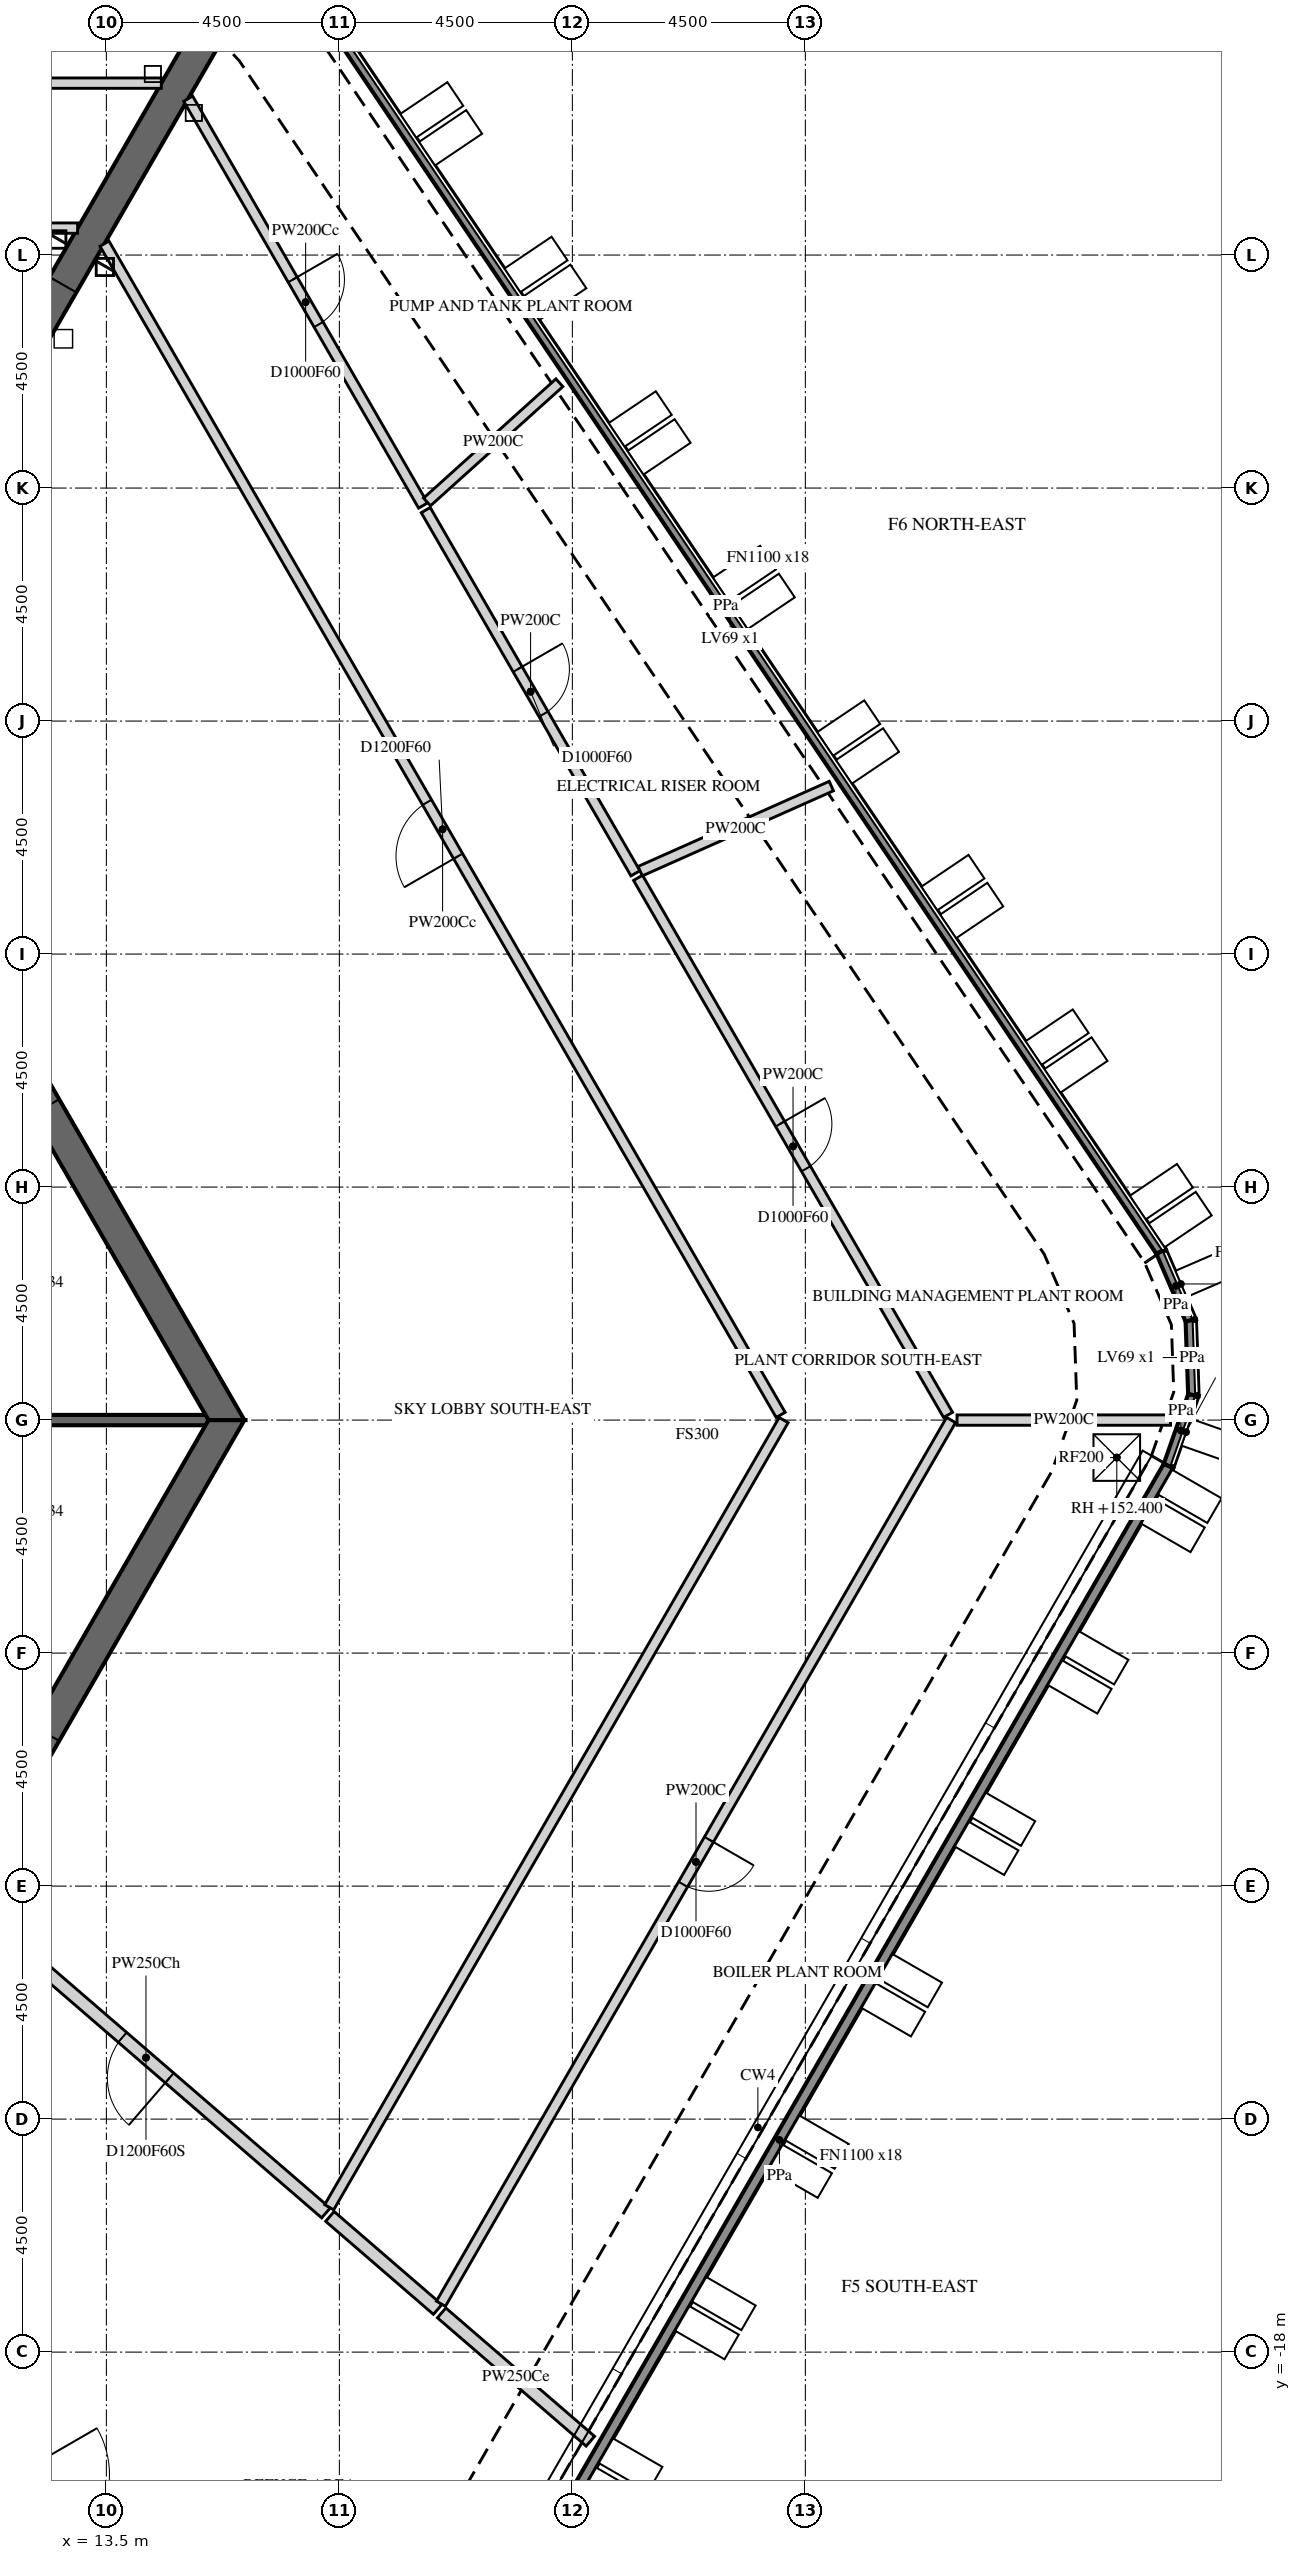
"""IFC4 building model, lengths in metres.
Left out: names, types, materials, properties, quantities, classifications, styles, units other than length and angle.
Written with IfcOpenShell. Run it as: python <this file> out.ifc"""

import sys

from ifc_helpers import new_model, si_unit, direction, frame, frame_2d, origin, origin_2d, place, context, subcontext, project, spatial, polyline, rectangle, outline, extrude, element, fill, save


model = new_model("IFC4")
c1 = context("Model", 3, precision=1e-05, world=origin(), true_north=direction((0.0, 1.0)))
c2 = subcontext(c1, "Body", "Model", "MODEL_VIEW")
j1 = project(units=[si_unit("LENGTHUNIT", "METRE"), si_unit("PLANEANGLEUNIT", "RADIAN")], contexts=[c1])
p1 = place(None, origin())
s1 = spatial("IfcSite", under=j1, at=p1, CompositionType="ELEMENT")
p2 = place(p1, origin())
s2 = spatial("IfcBuilding", under=s1, at=p2, CompositionType="ELEMENT")
p3 = place(p2, frame((0.0, 0.0, 146.7)))
s3 = spatial("IfcBuildingStorey", under=s2, at=p3, CompositionType="ELEMENT", Elevation=146.7)
p4 = place(p3, frame((17.062, 28.174, 5.7), z_axis=(0.0, 0.0, 1.0), x_axis=(0.559191272145, -0.829038672896, 0.0)))
e1 = element("IfcWall", 1, at=p4, inside=s3, PredefinedType="PARAPET", context=c2, shape_type="SweptSolid", body=[
    extrude(outline(polyline([(0.008, -0.1), (30.044, -0.1), (30.063, 0.1), (-0.008, 0.1), (0.008, -0.1)])), origin(), (0.0, 0.0, 1.0), 1.1),
])
p5 = place(p3, frame((33.868, 3.259, 5.7), z_axis=(0.0, 0.0, 1.0), x_axis=(0.396149459685, -0.918186040839, 0.0)))
e2 = element("IfcWall", 2, at=p5, inside=s3, PredefinedType="PARAPET", context=c2, shape_type="SweptSolid", body=[
    extrude(outline(polyline([(0.009, -0.1), (1.434, -0.1), (1.471, 0.1), (-0.009, 0.1), (0.009, -0.1)])), origin(), (0.0, 0.0, 1.0), 1.1),
])
p6 = place(p3, frame((34.443, 1.925, 5.7), z_axis=(0.0, 0.0, 1.0), x_axis=(0.034852691187, -0.999392460406, 0.0)))
e3 = element("IfcWall", 3, at=p6, inside=s3, PredefinedType="PARAPET", context=c2, shape_type="SweptSolid", body=[
    extrude(outline(polyline([(0.019, -0.1), (1.424, -0.1), (1.462, 0.1), (-0.019, 0.1), (0.019, -0.1)])), origin(), (0.0, 0.0, 1.0), 1.1),
])
p7 = place(p3, frame((34.494, 0.483, 5.7), z_axis=(0.0, 0.0, 1.0), x_axis=(-0.331061462049, -0.943609192593, 0.0)))
e4 = element("IfcWall", 4, at=p7, inside=s3, PredefinedType="PARAPET", context=c2, shape_type="SweptSolid", body=[
    extrude(outline(polyline([(0.019, -0.1), (1.444, -0.1), (1.462, 0.1), (-0.019, 0.1), (0.019, -0.1)])), origin(), (0.0, 0.0, 1.0), 1.1),
])
p8 = place(p3, frame((34.013, -0.888, 5.7), z_axis=(0.0, 0.0, 1.0), x_axis=(-0.499996465352, -0.866027444505, 0.0)))
e5 = element("IfcWall", 5, at=p8, inside=s3, PredefinedType="PARAPET", context=c2, shape_type="SweptSolid", body=[
    extrude(outline(polyline([(0.009, -0.1), (30.045, -0.1), (30.062, 0.1), (-0.009, 0.1), (0.009, -0.1)])), origin(), (0.0, 0.0, 1.0), 1.1),
])
p9 = place(p3, frame((7.91, -13.7, -0.3), z_axis=(0.0, 0.0, 1.0), x_axis=(0.499999880136, 0.866025472988, 0.0)))
e6 = element("IfcWall", 6, at=p9, inside=s3, PredefinedType="SHEAR", context=c2, shape_type="SweptSolid", body=[
    extrude(outline(polyline([(-0.173, -0.3), (15.993, -0.3), (15.646, 0.3), (0.173, 0.3), (-0.173, -0.3)])), origin(), (0.0, 0.0, 1.0), 5.8),
])
p10 = place(p9, frame((7.039, 0.0, 0.3)))
e7 = element("IfcOpeningElement", 7, at=p10, cuts=e6, PredefinedType="OPENING", context=c2, shape_type="SweptSolid", body=[
    extrude(rectangle(XDim=1.8, YDim=2.4, at=frame_2d((0.9, 1.2))), frame((0.0, 0.31, 0.0), z_axis=(0.0, -1.0, 0.0), x_axis=(1.0, 0.0, 0.0)), (0.0, 0.0, 1.0), 0.62),
])
p11 = place(p3, frame((15.819, 0.0, -0.3), z_axis=(0.0, 0.0, 1.0), x_axis=(-0.499999880136, 0.866025472988, 0.0)))
e8 = element("IfcWall", 8, at=p11, inside=s3, PredefinedType="SHEAR", context=c2, shape_type="SweptSolid", body=[
    extrude(outline(polyline([(-0.173, -0.3), (15.993, -0.3), (15.646, 0.3), (0.173, 0.3), (-0.173, -0.3)])), origin(), (0.0, 0.0, 1.0), 5.8),
])
p12 = place(p11, frame((6.981, 0.0, 0.3)))
e9 = element("IfcOpeningElement", 9, at=p12, cuts=e8, PredefinedType="OPENING", context=c2, shape_type="SweptSolid", body=[
    extrude(rectangle(XDim=1.8, YDim=2.4, at=frame_2d((0.9, 1.2))), frame((0.0, 0.31, 0.0), z_axis=(0.0, -1.0, 0.0), x_axis=(1.0, 0.0, 0.0)), (0.0, 0.0, 1.0), 0.62),
])
p13 = place(p3, frame((8.083, 14.0, -0.3), z_axis=(0.0, 0.0, 1.0), x_axis=(0.499997680643, 0.866026742862, 0.0)))
e10 = element("IfcWall", 10, at=p13, inside=s3, PredefinedType="SHEAR", context=c2, shape_type="SweptSolid", body=[
    extrude(rectangle(XDim=16.509, YDim=0.6, at=frame_2d((8.254, 0.0))), origin(), (0.0, 0.0, 1.0), 5.8),
])
p14 = place(p13, frame((7.354, 0.0, 0.3)))
e11 = element("IfcOpeningElement", 11, at=p14, cuts=e10, PredefinedType="OPENING", context=c2, shape_type="SweptSolid", body=[
    extrude(rectangle(XDim=1.8, YDim=2.4, at=frame_2d((0.9, 1.2))), frame((0.0, 0.31, 0.0), z_axis=(0.0, -1.0, 0.0), x_axis=(1.0, 0.0, 0.0)), (0.0, 0.0, 1.0), 0.62),
])
p15 = place(p3, frame((8.083, -14.0, -0.3), z_axis=(0.0, 0.0, 1.0), x_axis=(0.499997680643, -0.866026742862, 0.0)))
e12 = element("IfcWall", 12, at=p15, inside=s3, PredefinedType="SHEAR", context=c2, shape_type="SweptSolid", body=[
    extrude(rectangle(XDim=16.509, YDim=0.6, at=frame_2d((8.254, 0.0))), origin(), (0.0, 0.0, 1.0), 5.8),
])
p16 = place(p15, frame((7.354, 0.0, 0.3)))
e13 = element("IfcOpeningElement", 13, at=p16, cuts=e12, PredefinedType="OPENING", context=c2, shape_type="SweptSolid", body=[
    extrude(rectangle(XDim=1.8, YDim=2.4, at=frame_2d((0.9, 1.2))), frame((0.0, 0.31, 0.0), z_axis=(0.0, -1.0, 0.0), x_axis=(1.0, 0.0, 0.0)), (0.0, 0.0, 1.0), 0.62),
])
p17 = place(p3, frame((11.547, 0.0, -0.3), z_axis=(0.0, 0.0, 1.0), x_axis=(1.0, 0.0, 0.0)))
e14 = element("IfcWall", 14, at=p17, inside=s3, PredefinedType="SHEAR", context=c2, shape_type="SweptSolid", body=[
    extrude(rectangle(XDim=3.926, YDim=0.2, at=frame_2d((1.963, 0.0))), origin(), (0.0, 0.0, 1.0), 5.8),
])
p18 = place(p3, frame((12.944, 23.02, 0.0), z_axis=(0.0, 0.0, 1.0), x_axis=(-1.0, 0.0, 0.0)))
e15 = element("IfcWall", 15, at=p18, inside=s3, PredefinedType="PARTITIONING", context=c2, shape_type="SweptSolid", body=[
    extrude(rectangle(XDim=26.12, YDim=0.2, at=frame_2d((13.06, 0.0))), origin(), (0.0, 0.0, 1.0), 5.5),
])
p19 = place(p3, frame((0.1, 25.82, 0.0), z_axis=(0.0, 0.0, 1.0), x_axis=(1.0, 0.0, 0.0)))
e16 = element("IfcWall", 16, at=p19, inside=s3, PredefinedType="PARTITIONING", context=c2, shape_type="SweptSolid", body=[
    extrude(rectangle(XDim=14.461, YDim=0.2, at=frame_2d((7.23, 0.0))), origin(), (0.0, 0.0, 1.0), 5.5),
])
p20 = place(p19, frame((6.73, 0.0, 0.0)))
e17 = element("IfcOpeningElement", 17, at=p20, cuts=e16, PredefinedType="OPENING", context=c2, shape_type="SweptSolid", body=[
    extrude(rectangle(XDim=1.0, YDim=2.1, at=frame_2d((0.5, 1.05))), frame((0.0, 0.11, 0.0), z_axis=(0.0, -1.0, 0.0), x_axis=(1.0, 0.0, 0.0)), (0.0, 0.0, 1.0), 0.22),
])
p21 = place(p3, frame((17.74, -15.313, 0.0), z_axis=(0.0, 0.0, 1.0), x_axis=(-0.756988584599, 0.653428100702, 0.0)))
e18 = element("IfcWall", 18, at=p21, inside=s3, PredefinedType="PARTITIONING", context=c2, shape_type="SweptSolid", body=[
    extrude(rectangle(XDim=9.182, YDim=0.25, at=frame_2d((4.591, 0.0))), origin(), (0.0, 0.0, 1.0), 4.573),
])
p22 = place(p21, frame((3.991, 0.0, 0.0)))
e19 = element("IfcOpeningElement", 19, at=p22, cuts=e18, PredefinedType="OPENING", context=c2, shape_type="SweptSolid", body=[
    extrude(rectangle(XDim=1.2, YDim=2.1, at=frame_2d((0.6, 1.05))), frame((0.0, 0.135, 0.0), z_axis=(0.0, -1.0, 0.0), x_axis=(1.0, 0.0, 0.0)), (0.0, 0.0, 1.0), 0.27),
])
p23 = place(p3, frame((17.804, -15.203, 0.0), z_axis=(0.0, 0.0, 1.0), x_axis=(0.499998136973, 0.866026479401, 0.0)))
e20 = element("IfcWall", 20, at=p23, inside=s3, PredefinedType="PARTITIONING", context=c2, shape_type="SweptSolid", body=[
    extrude(rectangle(XDim=17.555, YDim=0.2, at=frame_2d((8.777, 0.0))), origin(), (0.0, 0.0, 1.0), 5.5),
])
p24 = place(p3, frame((15.08, 25.52, 0.0), z_axis=(0.0, 0.0, 1.0), x_axis=(0.50005476547, -0.865993782617, 0.0)))
e21 = element("IfcWall", 21, at=p24, inside=s3, PredefinedType="PARTITIONING", context=c2, shape_type="SweptSolid", body=[
    extrude(rectangle(XDim=9.073, YDim=0.2, at=frame_2d((4.536, 0.0))), origin(), (0.0, 0.0, 1.0), 4.573),
])
p25 = place(p24, frame((4.036, 0.0, 0.0)))
e22 = element("IfcOpeningElement", 22, at=p25, cuts=e21, PredefinedType="OPENING", context=c2, shape_type="SweptSolid", body=[
    extrude(rectangle(XDim=1.0, YDim=2.1, at=frame_2d((0.5, 1.05))), frame((0.0, 0.11, 0.0), z_axis=(0.0, -1.0, 0.0), x_axis=(1.0, 0.0, 0.0)), (0.0, 0.0, 1.0), 0.22),
])
p26 = place(p3, frame((19.898, -17.176, 0.0), z_axis=(0.0, 0.0, 1.0), x_axis=(-0.756944808976, 0.6534788108, 0.0)))
e23 = element("IfcWall", 23, at=p26, inside=s3, PredefinedType="PARTITIONING", context=c2, shape_type="SweptSolid", body=[
    extrude(rectangle(XDim=2.749, YDim=0.25, at=frame_2d((1.375, 0.0))), origin(), (0.0, 0.0, 1.0), 5.5),
])
p27 = place(p3, frame((29.814, 0.0, 0.0), z_axis=(0.0, 0.0, 1.0), x_axis=(-0.499978059593, -0.866038070713, 0.0)))
e24 = element("IfcWall", 24, at=p27, inside=s3, PredefinedType="PARTITIONING", context=c2, shape_type="SweptSolid", body=[
    extrude(rectangle(XDim=19.706, YDim=0.2, at=frame_2d((9.853, 0.0))), origin(), (0.0, 0.0, 1.0), 5.5),
])
p28 = place(p27, frame((9.353, 0.0, 0.0)))
e25 = element("IfcOpeningElement", 25, at=p28, cuts=e24, PredefinedType="OPENING", context=c2, shape_type="SweptSolid", body=[
    extrude(rectangle(XDim=1.0, YDim=2.1, at=frame_2d((0.5, 1.05))), frame((0.0, 0.11, 0.0), z_axis=(0.0, -1.0, 0.0), x_axis=(1.0, 0.0, 0.0)), (0.0, 0.0, 1.0), 0.22),
])
p29 = place(p3, frame((22.25, 20.034, 0.0), z_axis=(0.0, 0.0, 1.0), x_axis=(-0.743075351074, -0.669207757446, 0.0)))
e26 = element("IfcWall", 26, at=p29, inside=s3, PredefinedType="PARTITIONING", context=c2, shape_type="SweptSolid", body=[
    extrude(rectangle(XDim=3.441, YDim=0.2, at=frame_2d((1.72, 0.0))), origin(), (0.0, 0.0, 1.0), 5.5),
])
p30 = place(p3, frame((22.847, -19.721, 0.0), z_axis=(0.0, 0.0, 1.0), x_axis=(-0.757131139974, 0.653262915587, 0.0)))
e27 = element("IfcWall", 27, at=p30, inside=s3, PredefinedType="PARTITIONING", context=c2, shape_type="SweptSolid", body=[
    extrude(rectangle(XDim=3.794, YDim=0.25, at=frame_2d((1.897, 0.0))), origin(), (0.0, 0.0, 1.0), 5.5),
])
p31 = place(p3, frame((19.668, 17.574, 0.0), z_axis=(0.0, 0.0, 1.0), x_axis=(0.50000337782, -0.86602345359, 0.0)))
e28 = element("IfcWall", 28, at=p31, inside=s3, PredefinedType="PARTITIONING", context=c2, shape_type="SweptSolid", body=[
    extrude(rectangle(XDim=8.1, YDim=0.2, at=frame_2d((4.05, 0.0))), origin(), (0.0, 0.0, 1.0), 5.5),
])
p32 = place(p31, frame((3.55, 0.0, 0.0)))
e29 = element("IfcOpeningElement", 29, at=p32, cuts=e28, PredefinedType="OPENING", context=c2, shape_type="SweptSolid", body=[
    extrude(rectangle(XDim=1.0, YDim=2.1, at=frame_2d((0.5, 1.05))), frame((0.0, 0.11, 0.0), z_axis=(0.0, -1.0, 0.0), x_axis=(1.0, 0.0, 0.0)), (0.0, 0.0, 1.0), 0.22),
])
p33 = place(p3, frame((26.523, 0.1, 0.0), z_axis=(0.0, 0.0, 1.0), x_axis=(-0.499985419657, 0.866033821586, 0.0)))
e30 = element("IfcWall", 30, at=p33, inside=s3, PredefinedType="PARTITIONING", context=c2, shape_type="SweptSolid", body=[
    extrude(rectangle(XDim=26.119, YDim=0.2, at=frame_2d((13.06, 0.0))), origin(), (0.0, 0.0, 1.0), 4.573),
])
p34 = place(p33, frame((12.459, 0.0, 0.0)))
e31 = element("IfcOpeningElement", 31, at=p34, cuts=e30, PredefinedType="OPENING", context=c2, shape_type="SweptSolid", body=[
    extrude(rectangle(XDim=1.2, YDim=2.1, at=frame_2d((0.6, 1.05))), frame((0.0, 0.11, 0.0), z_axis=(0.0, -1.0, 0.0), x_axis=(1.0, 0.0, 0.0)), (0.0, 0.0, 1.0), 0.22),
])
p35 = place(p3, frame((27.502, 12.244, 0.0), z_axis=(0.0, 0.0, 1.0), x_axis=(-0.913562251787, -0.406698920714, 0.0)))
e32 = element("IfcWall", 32, at=p35, inside=s3, PredefinedType="PARTITIONING", context=c2, shape_type="SweptSolid", body=[
    extrude(rectangle(XDim=4.041, YDim=0.2, at=frame_2d((2.021, 0.0))), origin(), (0.0, 0.0, 1.0), 5.5),
])
p36 = place(p3, frame((23.768, 10.473, 0.0), z_axis=(0.0, 0.0, 1.0), x_axis=(0.499955956564, -0.866050830781, 0.0)))
e33 = element("IfcWall", 33, at=p36, inside=s3, PredefinedType="PARTITIONING", context=c2, shape_type="SweptSolid", body=[
    extrude(rectangle(XDim=11.977, YDim=0.2, at=frame_2d((5.989, 0.0))), origin(), (0.0, 0.0, 1.0), 5.5),
])
p37 = place(p36, frame((5.489, 0.0, 0.0)))
e34 = element("IfcOpeningElement", 34, at=p37, cuts=e33, PredefinedType="OPENING", context=c2, shape_type="SweptSolid", body=[
    extrude(rectangle(XDim=1.0, YDim=2.1, at=frame_2d((0.5, 1.05))), frame((0.0, 0.11, 0.0), z_axis=(0.0, -1.0, 0.0), x_axis=(1.0, 0.0, 0.0)), (0.0, 0.0, 1.0), 0.22),
])
p38 = place(p3, frame((34.053, 0.0, 0.0), z_axis=(0.0, 0.0, 1.0), x_axis=(-1.0, 0.0, 0.0)))
e35 = element("IfcWall", 35, at=p38, inside=s3, PredefinedType="PARTITIONING", context=c2, shape_type="SweptSolid", body=[
    extrude(rectangle(XDim=4.124, YDim=0.2, at=frame_2d((2.062, 0.0))), origin(), (0.0, 0.0, 1.0), 5.5),
])
p39 = place(p3, frame((0.0, 0.0, 5.5)))
p40 = place(p39, frame((33.015, -0.724, 0.0)))
p41 = place(p40, frame((0.0, 0.0, 0.15)))
e36 = element("IfcDoor", 36, at=p41, inside=s3, OperationType="SINGLE_SWING_LEFT", PredefinedType="TRAPDOOR", context=c2, shape_type="SweptSolid", body=[
    extrude(rectangle(XDim=0.9, YDim=0.9, at=origin_2d()), origin(), (0.0, 0.0, 1.0), 0.05),
])
p42 = place(p14, origin())
e37 = element("IfcDoor", 37, at=p42, inside=s3, OperationType="DOUBLE_DOOR_SINGLE_SWING", PredefinedType="DOOR", context=c2, shape_type="SweptSolid", body=[
    extrude(rectangle(XDim=1.8, YDim=2.4, at=frame_2d((0.9, 1.2))), frame((0.0, 0.025, 0.0), z_axis=(0.0, -1.0, 0.0), x_axis=(1.0, 0.0, 0.0)), (0.0, 0.0, 1.0), 0.05),
])
fill(e11, e37)
p43 = place(p16, origin())
e38 = element("IfcDoor", 38, at=p43, inside=s3, OperationType="DOUBLE_DOOR_SINGLE_SWING", PredefinedType="DOOR", context=c2, shape_type="SweptSolid", body=[
    extrude(rectangle(XDim=1.8, YDim=2.4, at=frame_2d((0.9, 1.2))), frame((0.0, 0.025, 0.0), z_axis=(0.0, -1.0, 0.0), x_axis=(1.0, 0.0, 0.0)), (0.0, 0.0, 1.0), 0.05),
])
fill(e13, e38)
p44 = place(p22, origin())
e39 = element("IfcDoor", 39, at=p44, inside=s3, OperationType="SINGLE_SWING_LEFT", PredefinedType="DOOR", context=c2, shape_type="SweptSolid", body=[
    extrude(rectangle(XDim=1.2, YDim=2.1, at=frame_2d((0.6, 1.05))), frame((0.0, 0.025, 0.0), z_axis=(0.0, -1.0, 0.0), x_axis=(1.0, 0.0, 0.0)), (0.0, 0.0, 1.0), 0.05),
])
fill(e19, e39)
p45 = place(p25, origin())
e40 = element("IfcDoor", 40, at=p45, inside=s3, OperationType="SINGLE_SWING_RIGHT", PredefinedType="DOOR", context=c2, shape_type="SweptSolid", body=[
    extrude(rectangle(XDim=1.0, YDim=2.1, at=frame_2d((0.5, 1.05))), frame((0.0, 0.025, 0.0), z_axis=(0.0, -1.0, 0.0), x_axis=(1.0, 0.0, 0.0)), (0.0, 0.0, 1.0), 0.05),
])
fill(e22, e40)
p46 = place(p28, origin())
e41 = element("IfcDoor", 41, at=p46, inside=s3, OperationType="SINGLE_SWING_LEFT", PredefinedType="DOOR", context=c2, shape_type="SweptSolid", body=[
    extrude(rectangle(XDim=1.0, YDim=2.1, at=frame_2d((0.5, 1.05))), frame((0.0, 0.025, 0.0), z_axis=(0.0, -1.0, 0.0), x_axis=(1.0, 0.0, 0.0)), (0.0, 0.0, 1.0), 0.05),
])
fill(e25, e41)
p47 = place(p32, origin())
e42 = element("IfcDoor", 42, at=p47, inside=s3, OperationType="SINGLE_SWING_RIGHT", PredefinedType="DOOR", context=c2, shape_type="SweptSolid", body=[
    extrude(rectangle(XDim=1.0, YDim=2.1, at=frame_2d((0.5, 1.05))), frame((0.0, 0.025, 0.0), z_axis=(0.0, -1.0, 0.0), x_axis=(1.0, 0.0, 0.0)), (0.0, 0.0, 1.0), 0.05),
])
fill(e29, e42)
p48 = place(p34, origin())
e43 = element("IfcDoor", 43, at=p48, inside=s3, OperationType="SINGLE_SWING_LEFT", PredefinedType="DOOR", context=c2, shape_type="SweptSolid", body=[
    extrude(rectangle(XDim=1.2, YDim=2.1, at=frame_2d((0.6, 1.05))), frame((0.0, 0.025, 0.0), z_axis=(0.0, -1.0, 0.0), x_axis=(1.0, 0.0, 0.0)), (0.0, 0.0, 1.0), 0.05),
])
fill(e31, e43)
p49 = place(p37, origin())
e44 = element("IfcDoor", 44, at=p49, inside=s3, OperationType="SINGLE_SWING_RIGHT", PredefinedType="DOOR", context=c2, shape_type="SweptSolid", body=[
    extrude(rectangle(XDim=1.0, YDim=2.1, at=frame_2d((0.5, 1.05))), frame((0.0, 0.025, 0.0), z_axis=(0.0, -1.0, 0.0), x_axis=(1.0, 0.0, 0.0)), (0.0, 0.0, 1.0), 0.05),
])
fill(e34, e44)
save(model, sys.argv[1])
